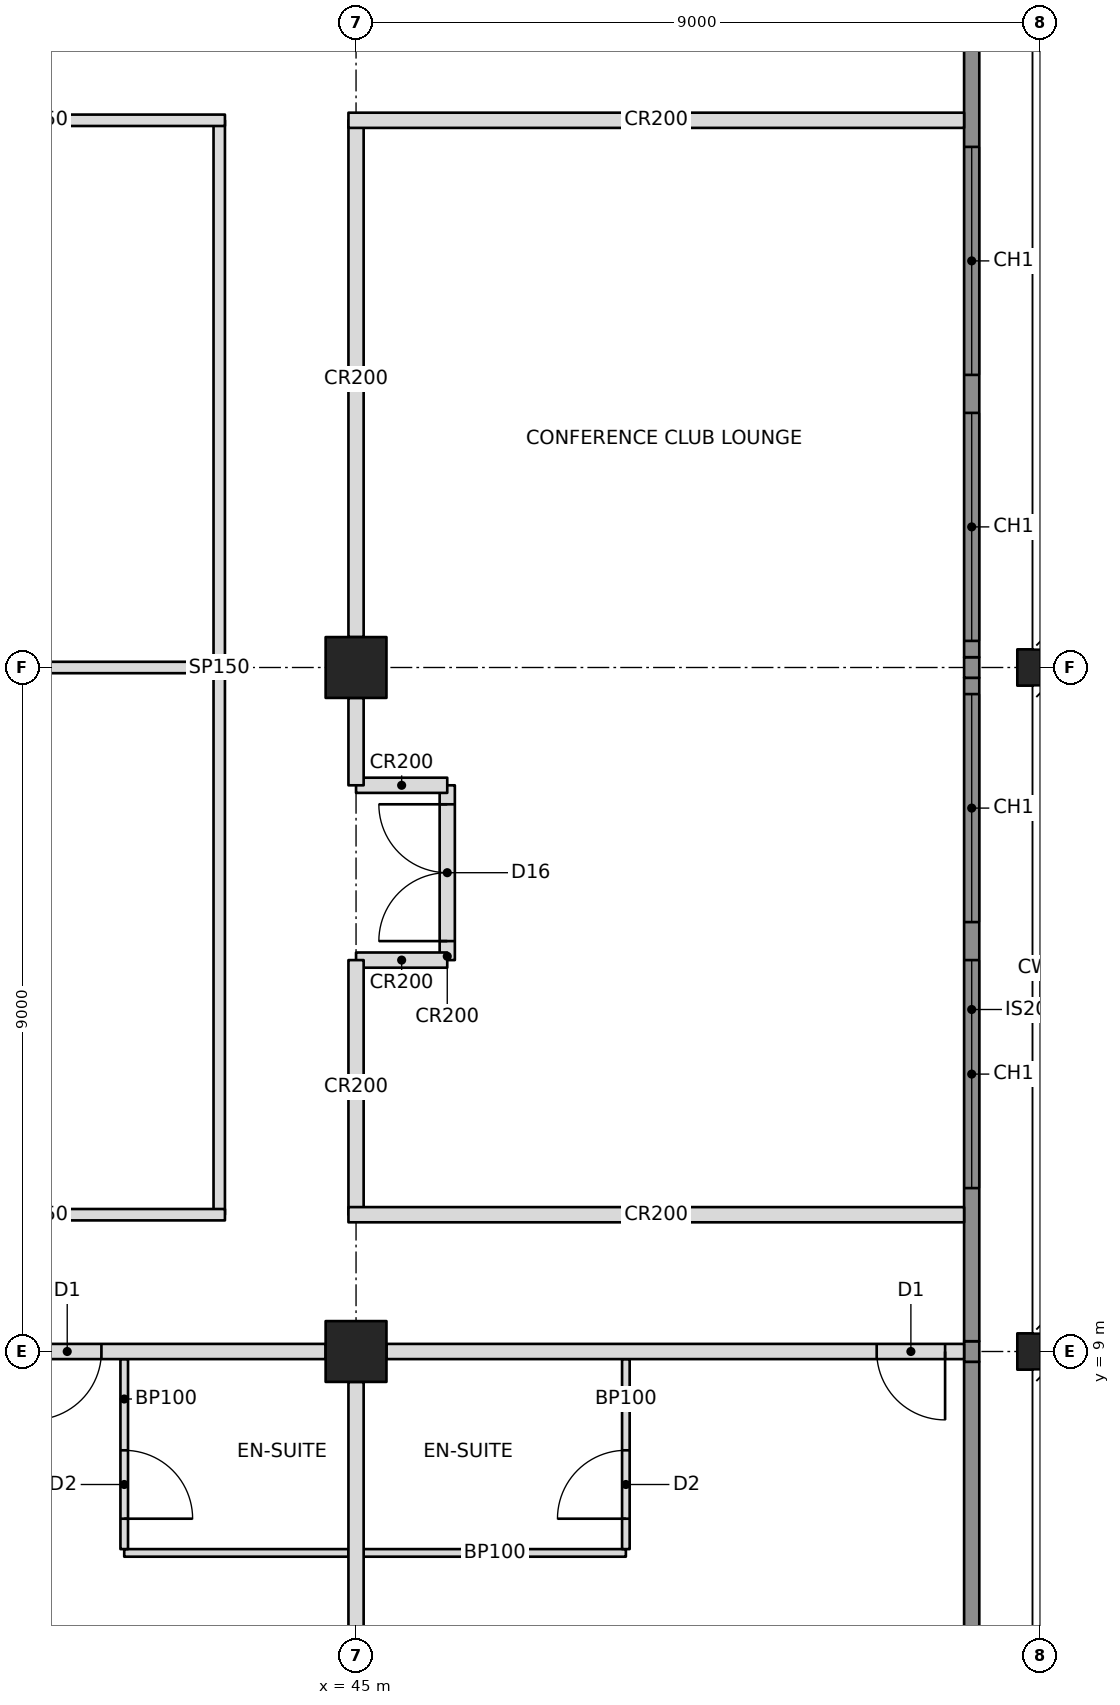
"""IFC4 building model, lengths in metres.
Left out: names, types, materials, properties, quantities, classifications, styles, units other than length and angle.
Written with IfcOpenShell. Run it as: python <this file> out.ifc"""

import sys

from ifc_helpers import new_model, si_unit, direction, frame, frame_2d, origin, origin_2d, place, context, subcontext, project, spatial, rectangle, hollow_rectangle, i_section, extrude, element, fill, save


model = new_model("IFC4")
c1 = context("Model", 3, precision=1e-05, world=origin(), true_north=direction((0.0, 1.0)))
c2 = subcontext(c1, "Body", "Model", "MODEL_VIEW")
j1 = project(units=[si_unit("LENGTHUNIT", "METRE"), si_unit("PLANEANGLEUNIT", "RADIAN")], contexts=[c1])
p1 = place(None, origin())
s1 = spatial("IfcSite", under=j1, at=p1, CompositionType="ELEMENT")
p2 = place(p1, origin())
s2 = spatial("IfcBuilding", under=s1, at=p2, CompositionType="ELEMENT")
p3 = place(p2, frame((0.0, 0.0, 28.0)))
s3 = spatial("IfcBuildingStorey", under=s2, at=p3, CompositionType="ELEMENT", Elevation=28.0)
for number, where, z_axis, x_axis in (
    (1, (45.0, 9.0, 0.0), (0.0, 0.0, 1.0), (0.0, 1.0, 0.0)),
    (2, (45.0, 18.0, 0.0), (0.0, 0.0, 1.0), (0.0, 1.0, 0.0)),
):
    element("IfcColumn", number, at=place(p3, frame(where, z_axis=z_axis, x_axis=x_axis)), inside=s3, PredefinedType="COLUMN", context=c2, shape_type="SweptSolid", body=[
        extrude(hollow_rectangle(XDim=0.8, YDim=0.8, WallThickness=0.1, at=origin_2d()), origin(), (0.0, 0.0, 1.0), 3.4),
    ])
for number, where, z_axis, x_axis in (
    (3, (54.0, 9.0, 0.0), (0.0, 0.0, 1.0), (0.0, 1.0, 0.0)),
    (4, (54.0, 18.0, 0.0), (0.0, 0.0, 1.0), (0.0, 1.0, 0.0)),
):
    element("IfcColumn", number, at=place(p3, frame(where, z_axis=z_axis, x_axis=x_axis)), inside=s3, PredefinedType="COLUMN", context=c2, shape_type="SweptSolid", body=[
        extrude(i_section(OverallWidth=0.478, OverallDepth=0.599, WebThickness=0.1, FlangeThickness=0.14, at=origin_2d()), origin(), (0.0, 0.0, 1.0), 3.4),
    ])
p4 = place(p3, frame((36.4, 9.0, 0.0), z_axis=(0.0, 0.0, 1.0), x_axis=(1.0, 0.0, 0.0)))
e5 = element("IfcWall", 5, at=p4, inside=s3, PredefinedType="PARTITIONING", context=c2, shape_type="SweptSolid", body=[
    extrude(rectangle(XDim=8.2, YDim=0.2, at=frame_2d((4.1, 0.0))), origin(), (0.0, 0.0, 1.0), 2.438),
])
p5 = place(p4, frame((2.95, 0.0, 0.0)))
e6 = element("IfcOpeningElement", 6, at=p5, cuts=e5, PredefinedType="OPENING", context=c2, shape_type="SweptSolid", body=[
    extrude(rectangle(XDim=0.9, YDim=2.1, at=frame_2d((0.45, 1.05))), frame((0.0, 0.11, 0.0), z_axis=(0.0, -1.0, 0.0), x_axis=(1.0, 0.0, 0.0)), (0.0, 0.0, 1.0), 0.22),
])
p6 = place(p4, frame((4.35, 0.0, 0.0)))
e7 = element("IfcOpeningElement", 7, at=p6, cuts=e5, PredefinedType="OPENING", context=c2, shape_type="SweptSolid", body=[
    extrude(rectangle(XDim=0.9, YDim=2.1, at=frame_2d((0.45, 1.05))), frame((0.0, 0.11, 0.0), z_axis=(0.0, -1.0, 0.0), x_axis=(1.0, 0.0, 0.0)), (0.0, 0.0, 1.0), 0.22),
])
p7 = place(p3, frame((45.4, 9.0, 0.0), z_axis=(0.0, 0.0, 1.0), x_axis=(1.0, 0.0, 0.0)))
e8 = element("IfcWall", 8, at=p7, inside=s3, PredefinedType="PARTITIONING", context=c2, shape_type="SweptSolid", body=[
    extrude(rectangle(XDim=7.6, YDim=0.2, at=frame_2d((3.8, 0.0))), origin(), (0.0, 0.0, 1.0), 2.438),
])
p8 = place(p7, frame((6.45, 0.0, 0.0)))
e9 = element("IfcOpeningElement", 9, at=p8, cuts=e8, PredefinedType="OPENING", context=c2, shape_type="SweptSolid", body=[
    extrude(rectangle(XDim=0.9, YDim=2.1, at=frame_2d((0.45, 1.05))), frame((0.0, 0.11, 0.0), z_axis=(0.0, -1.0, 0.0), x_axis=(1.0, 0.0, 0.0)), (0.0, 0.0, 1.0), 0.22),
])
p9 = place(p3, frame((34.2, 10.8, 0.0), z_axis=(0.0, 0.0, 1.0), x_axis=(1.0, 0.0, 0.0)))
e10 = element("IfcWall", 10, at=p9, inside=s3, PredefinedType="PARTITIONING", context=c2, shape_type="SweptSolid", body=[
    extrude(rectangle(XDim=9.075, YDim=0.15, at=frame_2d((4.538, 0.0))), origin(), (0.0, 0.0, 1.0), 2.404),
])
p10 = place(p9, frame((3.0, 0.0, 0.0)))
e11 = element("IfcOpeningElement", 11, at=p10, cuts=e10, PredefinedType="OPENING", context=c2, shape_type="SweptSolid", body=[
    extrude(rectangle(XDim=1.0, YDim=2.1, at=frame_2d((0.5, 1.05))), frame((0.0, 0.085, 0.0), z_axis=(0.0, -1.0, 0.0), x_axis=(1.0, 0.0, 0.0)), (0.0, 0.0, 1.0), 0.17),
])
p11 = place(p3, frame((34.2, 25.2, 0.0), z_axis=(0.0, 0.0, 1.0), x_axis=(1.0, 0.0, 0.0)))
e12 = element("IfcWall", 12, at=p11, inside=s3, PredefinedType="PARTITIONING", context=c2, shape_type="SweptSolid", body=[
    extrude(rectangle(XDim=9.075, YDim=0.15, at=frame_2d((4.538, 0.0))), origin(), (0.0, 0.0, 1.0), 2.404),
])
p12 = place(p11, frame((3.0, 0.0, 0.0)))
e13 = element("IfcOpeningElement", 13, at=p12, cuts=e12, PredefinedType="OPENING", context=c2, shape_type="SweptSolid", body=[
    extrude(rectangle(XDim=1.0, YDim=2.1, at=frame_2d((0.5, 1.05))), frame((0.0, 0.085, 0.0), z_axis=(0.0, -1.0, 0.0), x_axis=(1.0, 0.0, 0.0)), (0.0, 0.0, 1.0), 0.17),
])
p13 = place(p3, frame((43.2, 10.8, 0.0), z_axis=(0.0, 0.0, 1.0), x_axis=(0.0, 1.0, 0.0)))
e14 = element("IfcWall", 14, at=p13, inside=s3, PredefinedType="PARTITIONING", context=c2, shape_type="SweptSolid", body=[
    extrude(rectangle(XDim=14.4, YDim=0.15, at=frame_2d((7.2, 0.0))), origin(), (0.0, 0.0, 1.0), 2.404),
])
p14 = place(p3, frame((36.4, 18.0, 0.0), z_axis=(0.0, 0.0, 1.0), x_axis=(1.0, 0.0, 0.0)))
e15 = element("IfcWall", 15, at=p14, inside=s3, PredefinedType="PARTITIONING", context=c2, shape_type="SweptSolid", body=[
    extrude(rectangle(XDim=6.725, YDim=0.15, at=frame_2d((3.363, 0.0))), origin(), (0.0, 0.0, 1.0), 2.405),
])
p15 = place(p3, frame((45.0, 10.8, 0.0), z_axis=(0.0, 0.0, 1.0), x_axis=(0.0, 1.0, 0.0)))
e16 = element("IfcWall", 16, at=p15, inside=s3, PredefinedType="PARTITIONING", context=c2, shape_type="SweptSolid", body=[
    extrude(rectangle(XDim=3.35, YDim=0.2, at=frame_2d((1.675, 0.0))), origin(), (0.0, 0.0, 1.0), 2.438),
])
p16 = place(p3, frame((45.0, 18.4, 0.0), z_axis=(0.0, 0.0, 1.0), x_axis=(0.0, 1.0, 0.0)))
e17 = element("IfcWall", 17, at=p16, inside=s3, PredefinedType="PARTITIONING", context=c2, shape_type="SweptSolid", body=[
    extrude(rectangle(XDim=6.8, YDim=0.2, at=frame_2d((3.4, 0.0))), origin(), (0.0, 0.0, 1.0), 2.438),
])
for number, where, z_axis, x_axis in (
    (18, (44.9, 10.8, 0.0), (0.0, 0.0, 1.0), (1.0, 0.0, 0.0)),
    (19, (44.9, 25.2, 0.0), (0.0, 0.0, 1.0), (1.0, 0.0, 0.0)),
):
    element("IfcWall", number, at=place(p3, frame(where, z_axis=z_axis, x_axis=x_axis)), inside=s3, PredefinedType="PARTITIONING", context=c2, shape_type="SweptSolid", body=[
        extrude(rectangle(XDim=8.1, YDim=0.2, at=frame_2d((4.05, 0.0))), origin(), (0.0, 0.0, 1.0), 2.438),
    ])
p17 = place(p3, frame((45.0, 8.6, 0.0), z_axis=(0.0, 0.0, 1.0), x_axis=(0.0, -1.0, 0.0)))
e20 = element("IfcWall", 20, at=p17, inside=s3, PredefinedType="PARTITIONING", context=c2, shape_type="SweptSolid", body=[
    extrude(rectangle(XDim=7.6, YDim=0.2, at=frame_2d((3.8, 0.0))), origin(), (0.0, 0.0, 1.0), 2.438),
])
p18 = place(p3, frame((41.95, 6.35, 0.0), z_axis=(0.0, 0.0, 1.0), x_axis=(1.0, 0.0, 0.0)))
e21 = element("IfcWall", 21, at=p18, inside=s3, PredefinedType="PARTITIONING", context=c2, shape_type="SweptSolid", body=[
    extrude(rectangle(XDim=2.95, YDim=0.1, at=frame_2d((1.475, 0.0))), origin(), (0.0, 0.0, 1.0), 2.438),
])
p19 = place(p3, frame((41.95, 8.9, 0.0), z_axis=(0.0, 0.0, 1.0), x_axis=(0.0, -1.0, 0.0)))
e22 = element("IfcWall", 22, at=p19, inside=s3, PredefinedType="PARTITIONING", context=c2, shape_type="SweptSolid", body=[
    extrude(rectangle(XDim=2.5, YDim=0.1, at=frame_2d((1.25, 0.0))), origin(), (0.0, 0.0, 1.0), 2.438),
])
p20 = place(p19, frame((1.2, 0.0, 0.0)))
e23 = element("IfcOpeningElement", 23, at=p20, cuts=e22, PredefinedType="OPENING", context=c2, shape_type="SweptSolid", body=[
    extrude(rectangle(XDim=0.9, YDim=2.1, at=frame_2d((0.45, 1.05))), frame((0.0, 0.06, 0.0), z_axis=(0.0, -1.0, 0.0), x_axis=(1.0, 0.0, 0.0)), (0.0, 0.0, 1.0), 0.12),
])
p21 = place(p3, frame((45.1, 6.35, 0.0), z_axis=(0.0, 0.0, 1.0), x_axis=(1.0, 0.0, 0.0)))
e24 = element("IfcWall", 24, at=p21, inside=s3, PredefinedType="PARTITIONING", context=c2, shape_type="SweptSolid", body=[
    extrude(rectangle(XDim=3.45, YDim=0.1, at=frame_2d((1.725, 0.0))), origin(), (0.0, 0.0, 1.0), 2.438),
])
p22 = place(p3, frame((48.55, 8.9, 0.0), z_axis=(0.0, 0.0, 1.0), x_axis=(0.0, -1.0, 0.0)))
e25 = element("IfcWall", 25, at=p22, inside=s3, PredefinedType="PARTITIONING", context=c2, shape_type="SweptSolid", body=[
    extrude(rectangle(XDim=2.5, YDim=0.1, at=frame_2d((1.25, 0.0))), origin(), (0.0, 0.0, 1.0), 2.438),
])
p23 = place(p22, frame((1.2, 0.0, 0.0)))
e26 = element("IfcOpeningElement", 26, at=p23, cuts=e25, PredefinedType="OPENING", context=c2, shape_type="SweptSolid", body=[
    extrude(rectangle(XDim=0.9, YDim=2.1, at=frame_2d((0.45, 1.05))), frame((0.0, 0.06, 0.0), z_axis=(0.0, -1.0, 0.0), x_axis=(1.0, 0.0, 0.0)), (0.0, 0.0, 1.0), 0.12),
])
p24 = place(p3, frame((45.0, 16.45, 0.0), z_axis=(0.0, 0.0, 1.0), x_axis=(0.0, 1.0, 0.0)))
e27 = element("IfcWall", 27, at=p24, inside=s3, PredefinedType="PARTITIONING", context=c2, shape_type="SweptSolid", body=[
    extrude(rectangle(XDim=1.15, YDim=0.2, at=frame_2d((0.575, 0.0))), origin(), (0.0, 0.0, 1.0), 2.438),
])
for number, where, z_axis, x_axis in (
    (28, (45.0, 14.15, 0.0), (0.0, 0.0, 1.0), (1.0, 0.0, 0.0)),
    (29, (45.0, 16.45, 0.0), (0.0, 0.0, 1.0), (1.0, 0.0, 0.0)),
):
    element("IfcWall", number, at=place(p3, frame(where, z_axis=z_axis, x_axis=x_axis)), inside=s3, PredefinedType="PARTITIONING", context=c2, shape_type="SweptSolid", body=[
        extrude(rectangle(XDim=1.2, YDim=0.2, at=frame_2d((0.6, 0.0))), origin(), (0.0, 0.0, 1.0), 2.438),
    ])
p25 = place(p3, frame((46.2, 14.15, 0.0), z_axis=(0.0, 0.0, 1.0), x_axis=(0.0, 1.0, 0.0)))
e30 = element("IfcWall", 30, at=p25, inside=s3, PredefinedType="PARTITIONING", context=c2, shape_type="SweptSolid", body=[
    extrude(rectangle(XDim=2.3, YDim=0.2, at=frame_2d((1.15, 0.0))), origin(), (0.0, 0.0, 1.0), 3.2),
])
p26 = place(p25, frame((0.25, 0.0, 0.0)))
e31 = element("IfcOpeningElement", 31, at=p26, cuts=e30, PredefinedType="OPENING", context=c2, shape_type="SweptSolid", body=[
    extrude(rectangle(XDim=1.8, YDim=2.4, at=frame_2d((0.9, 1.2))), frame((0.0, 0.11, 0.0), z_axis=(0.0, -1.0, 0.0), x_axis=(1.0, 0.0, 0.0)), (0.0, 0.0, 1.0), 0.22),
])
p27 = place(p3, frame((53.1, 4.607, 0.0), z_axis=(0.0, 0.0, 1.0), x_axis=(0.0, 1.0, 0.0)))
e32 = element("IfcWall", 32, at=p27, inside=s3, PredefinedType="SOLIDWALL", context=c2, shape_type="SweptSolid", body=[
    extrude(rectangle(XDim=4.257, YDim=0.2, at=frame_2d((2.129, 0.0))), origin(), (0.0, 0.0, 1.0), 3.2),
])
p28 = place(p3, frame((53.1, 8.865, 0.0), z_axis=(0.0, 0.0, 1.0), x_axis=(0.0, 1.0, 0.0)))
e33 = element("IfcWall", 33, at=p28, inside=s3, PredefinedType="SOLIDWALL", context=c2, shape_type="SweptSolid", body=[
    extrude(rectangle(XDim=0.271, YDim=0.2, at=frame_2d((0.135, 0.0))), origin(), (0.0, 0.0, 1.0), 2.438),
])
p29 = place(p3, frame((53.1, 9.135, 0.0), z_axis=(0.0, 0.0, 1.0), x_axis=(0.0, 1.0, 0.0)))
e34 = element("IfcWall", 34, at=p29, inside=s3, PredefinedType="SOLIDWALL", context=c2, shape_type="SweptSolid", body=[
    extrude(rectangle(XDim=8.729, YDim=0.2, at=frame_2d((4.365, 0.0))), origin(), (0.0, 0.0, 1.0), 3.2),
])
p30 = place(p29, frame((2.015, 0.0, 0.6)))
e35 = element("IfcOpeningElement", 35, at=p30, cuts=e34, PredefinedType="OPENING", context=c2, shape_type="SweptSolid", body=[
    extrude(rectangle(XDim=3.0, YDim=2.2, at=frame_2d((1.5, 1.1))), frame((0.0, 0.11, 0.0), z_axis=(0.0, -1.0, 0.0), x_axis=(1.0, 0.0, 0.0)), (0.0, 0.0, 1.0), 0.22),
])
p31 = place(p29, frame((5.515, 0.0, 0.6)))
e36 = element("IfcOpeningElement", 36, at=p31, cuts=e34, PredefinedType="OPENING", context=c2, shape_type="SweptSolid", body=[
    extrude(rectangle(XDim=3.0, YDim=2.2, at=frame_2d((1.5, 1.1))), frame((0.0, 0.11, 0.0), z_axis=(0.0, -1.0, 0.0), x_axis=(1.0, 0.0, 0.0)), (0.0, 0.0, 1.0), 0.22),
])
p32 = place(p3, frame((53.1, 17.865, 0.0), z_axis=(0.0, 0.0, 1.0), x_axis=(0.0, 1.0, 0.0)))
e37 = element("IfcWall", 37, at=p32, inside=s3, PredefinedType="SOLIDWALL", context=c2, shape_type="SweptSolid", body=[
    extrude(rectangle(XDim=0.271, YDim=0.2, at=frame_2d((0.135, 0.0))), origin(), (0.0, 0.0, 1.0), 2.438),
])
p33 = place(p3, frame((53.1, 18.135, 0.0), z_axis=(0.0, 0.0, 1.0), x_axis=(0.0, 1.0, 0.0)))
e38 = element("IfcWall", 38, at=p33, inside=s3, PredefinedType="SOLIDWALL", context=c2, shape_type="SweptSolid", body=[
    extrude(rectangle(XDim=8.729, YDim=0.2, at=frame_2d((4.365, 0.0))), origin(), (0.0, 0.0, 1.0), 3.2),
])
p34 = place(p33, frame((0.215, 0.0, 0.6)))
e39 = element("IfcOpeningElement", 39, at=p34, cuts=e38, PredefinedType="OPENING", context=c2, shape_type="SweptSolid", body=[
    extrude(rectangle(XDim=3.0, YDim=2.2, at=frame_2d((1.5, 1.1))), frame((0.0, 0.11, 0.0), z_axis=(0.0, -1.0, 0.0), x_axis=(1.0, 0.0, 0.0)), (0.0, 0.0, 1.0), 0.22),
])
p35 = place(p33, frame((3.715, 0.0, 0.6)))
e40 = element("IfcOpeningElement", 40, at=p35, cuts=e38, PredefinedType="OPENING", context=c2, shape_type="SweptSolid", body=[
    extrude(rectangle(XDim=3.0, YDim=2.2, at=frame_2d((1.5, 1.1))), frame((0.0, 0.11, 0.0), z_axis=(0.0, -1.0, 0.0), x_axis=(1.0, 0.0, 0.0)), (0.0, 0.0, 1.0), 0.22),
])
p36 = place(p30, origin())
e41 = element("IfcWindow", 41, at=p36, inside=s3, PartitioningType="TRIPLE_PANEL_VERTICAL", PredefinedType="WINDOW", context=c2, shape_type="SweptSolid", body=[
    extrude(rectangle(XDim=3.0, YDim=2.2, at=frame_2d((1.5, 1.1))), frame((0.0, 0.03, 0.0), z_axis=(0.0, -1.0, 0.0), x_axis=(1.0, 0.0, 0.0)), (0.0, 0.0, 1.0), 0.06),
])
fill(e35, e41)
p37 = place(p31, origin())
e42 = element("IfcWindow", 42, at=p37, inside=s3, PartitioningType="TRIPLE_PANEL_VERTICAL", PredefinedType="WINDOW", context=c2, shape_type="SweptSolid", body=[
    extrude(rectangle(XDim=3.0, YDim=2.2, at=frame_2d((1.5, 1.1))), frame((0.0, 0.03, 0.0), z_axis=(0.0, -1.0, 0.0), x_axis=(1.0, 0.0, 0.0)), (0.0, 0.0, 1.0), 0.06),
])
fill(e36, e42)
p38 = place(p34, origin())
e43 = element("IfcWindow", 43, at=p38, inside=s3, PartitioningType="TRIPLE_PANEL_VERTICAL", PredefinedType="WINDOW", context=c2, shape_type="SweptSolid", body=[
    extrude(rectangle(XDim=3.0, YDim=2.2, at=frame_2d((1.5, 1.1))), frame((0.0, 0.03, 0.0), z_axis=(0.0, -1.0, 0.0), x_axis=(1.0, 0.0, 0.0)), (0.0, 0.0, 1.0), 0.06),
])
fill(e39, e43)
p39 = place(p35, origin())
e44 = element("IfcWindow", 44, at=p39, inside=s3, PartitioningType="TRIPLE_PANEL_VERTICAL", PredefinedType="WINDOW", context=c2, shape_type="SweptSolid", body=[
    extrude(rectangle(XDim=3.0, YDim=2.2, at=frame_2d((1.5, 1.1))), frame((0.0, 0.03, 0.0), z_axis=(0.0, -1.0, 0.0), x_axis=(1.0, 0.0, 0.0)), (0.0, 0.0, 1.0), 0.06),
])
fill(e40, e44)
p40 = place(p20, origin())
e45 = element("IfcDoor", 45, at=p40, inside=s3, OperationType="SINGLE_SWING_RIGHT", PredefinedType="DOOR", context=c2, shape_type="SweptSolid", body=[
    extrude(rectangle(XDim=0.9, YDim=2.1, at=frame_2d((0.45, 1.05))), frame((0.0, 0.025, 0.0), z_axis=(0.0, -1.0, 0.0), x_axis=(1.0, 0.0, 0.0)), (0.0, 0.0, 1.0), 0.05),
])
fill(e23, e45)
p41 = place(p6, frame((0.9, 0.0, 0.0), z_axis=(0.0, 0.0, 1.0), x_axis=(-1.0, 0.0, 0.0)))
e46 = element("IfcDoor", 46, at=p41, inside=s3, OperationType="SINGLE_SWING_RIGHT", PredefinedType="DOOR", context=c2, shape_type="SweptSolid", body=[
    extrude(rectangle(XDim=0.9, YDim=2.1, at=frame_2d((0.45, 1.05))), frame((0.0, 0.025, 0.0), z_axis=(0.0, -1.0, 0.0), x_axis=(1.0, 0.0, 0.0)), (0.0, 0.0, 1.0), 0.05),
])
fill(e7, e46)
p42 = place(p23, frame((0.9, 0.0, 0.0), z_axis=(0.0, 0.0, 1.0), x_axis=(-1.0, 0.0, 0.0)))
e47 = element("IfcDoor", 47, at=p42, inside=s3, OperationType="SINGLE_SWING_LEFT", PredefinedType="DOOR", context=c2, shape_type="SweptSolid", body=[
    extrude(rectangle(XDim=0.9, YDim=2.1, at=frame_2d((0.45, 1.05))), frame((0.0, 0.025, 0.0), z_axis=(0.0, -1.0, 0.0), x_axis=(1.0, 0.0, 0.0)), (0.0, 0.0, 1.0), 0.05),
])
fill(e26, e47)
p43 = place(p8, frame((0.9, 0.0, 0.0), z_axis=(0.0, 0.0, 1.0), x_axis=(-1.0, 0.0, 0.0)))
e48 = element("IfcDoor", 48, at=p43, inside=s3, OperationType="SINGLE_SWING_LEFT", PredefinedType="DOOR", context=c2, shape_type="SweptSolid", body=[
    extrude(rectangle(XDim=0.9, YDim=2.1, at=frame_2d((0.45, 1.05))), frame((0.0, 0.025, 0.0), z_axis=(0.0, -1.0, 0.0), x_axis=(1.0, 0.0, 0.0)), (0.0, 0.0, 1.0), 0.05),
])
fill(e9, e48)
p44 = place(p26, origin())
e49 = element("IfcDoor", 49, at=p44, inside=s3, OperationType="DOUBLE_DOOR_SINGLE_SWING", PredefinedType="DOOR", context=c2, shape_type="SweptSolid", body=[
    extrude(rectangle(XDim=1.8, YDim=2.4, at=frame_2d((0.9, 1.2))), frame((0.0, 0.025, 0.0), z_axis=(0.0, -1.0, 0.0), x_axis=(1.0, 0.0, 0.0)), (0.0, 0.0, 1.0), 0.05),
])
fill(e31, e49)
save(model, sys.argv[1])
